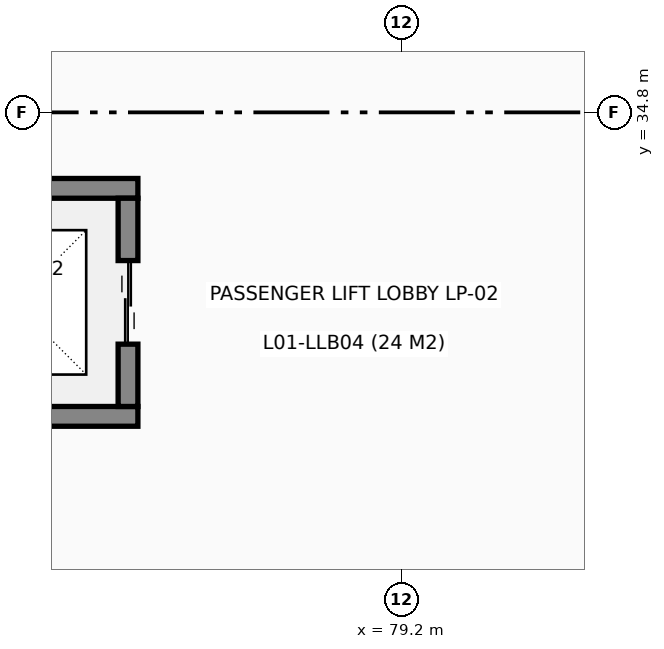
"""IFC4 building model, lengths in metres.
Left out: names, types, materials, properties, quantities, classifications, styles, units other than length and angle.
Written with IfcOpenShell. Run it as: python <this file> out.ifc"""

import sys

from ifc_helpers import new_model, si_unit, direction, frame, frame_2d, origin, place, context, subcontext, project, spatial, rectangle, extrude, element, fill, save


model = new_model("IFC4")
c1 = context("Model", 3, precision=1e-05, world=origin(), true_north=direction((0.0, 1.0)))
c2 = subcontext(c1, "Body", "Model", "MODEL_VIEW")
j1 = project(units=[si_unit("LENGTHUNIT", "METRE"), si_unit("PLANEANGLEUNIT", "RADIAN")], contexts=[c1])
p1 = place(None, origin())
s1 = spatial("IfcSite", under=j1, at=p1, CompositionType="ELEMENT")
p2 = place(p1, origin())
s2 = spatial("IfcBuilding", under=s1, at=p2, CompositionType="ELEMENT")
p3 = place(p2, frame((0.0, 0.0, 4.8)))
s3 = spatial("IfcBuildingStorey", under=s2, at=p3, CompositionType="ELEMENT", Elevation=4.8)
for number, where, z_axis, x_axis in (
    (1, (72.47, 30.8, 0.0), (0.0, 0.0, 1.0), (1.0, 0.0, 0.0)),
    (2, (72.47, 33.8, 0.0), (0.0, 0.0, 1.0), (1.0, 0.0, 0.0)),
):
    element("IfcWall", number, at=place(p3, frame(where, z_axis=z_axis, x_axis=x_axis)), inside=s3, PredefinedType="SHEAR", context=c2, shape_type="SweptSolid", body=[
        extrude(rectangle(XDim=3.26, YDim=0.26, at=frame_2d((1.63, 0.0))), origin(), (0.0, 0.0, 1.0), 4.56),
    ])
p4 = place(p3, frame((75.6, 30.93, 0.0), z_axis=(0.0, 0.0, 1.0), x_axis=(0.0, 1.0, 0.0)))
e3 = element("IfcWall", 3, at=p4, inside=s3, PredefinedType="SHEAR", context=c2, shape_type="SweptSolid", body=[
    extrude(rectangle(XDim=2.74, YDim=0.26, at=frame_2d((1.37, 0.0))), origin(), (0.0, 0.0, 1.0), 4.56),
])
p5 = place(p4, frame((0.82, 0.0, 0.0)))
e4 = element("IfcOpeningElement", 4, at=p5, cuts=e3, PredefinedType="OPENING", context=c2, shape_type="SweptSolid", body=[
    extrude(rectangle(XDim=1.1, YDim=2.15, at=frame_2d((0.55, 1.075))), frame((0.0, 0.14, 0.0), z_axis=(0.0, -1.0, 0.0), x_axis=(1.0, 0.0, 0.0)), (0.0, 0.0, 1.0), 0.28),
])
p6 = place(p5, origin())
e5 = element("IfcDoor", 5, at=p6, inside=s3, OperationType="DOUBLE_DOOR_SLIDING", PredefinedType="DOOR", context=c2, shape_type="SweptSolid", body=[
    extrude(rectangle(XDim=1.1, YDim=2.15, at=frame_2d((0.55, 1.075))), frame((0.0, 0.025, 0.0), z_axis=(0.0, -1.0, 0.0), x_axis=(1.0, 0.0, 0.0)), (0.0, 0.0, 1.0), 0.05),
])
fill(e4, e5)
save(model, sys.argv[1])
